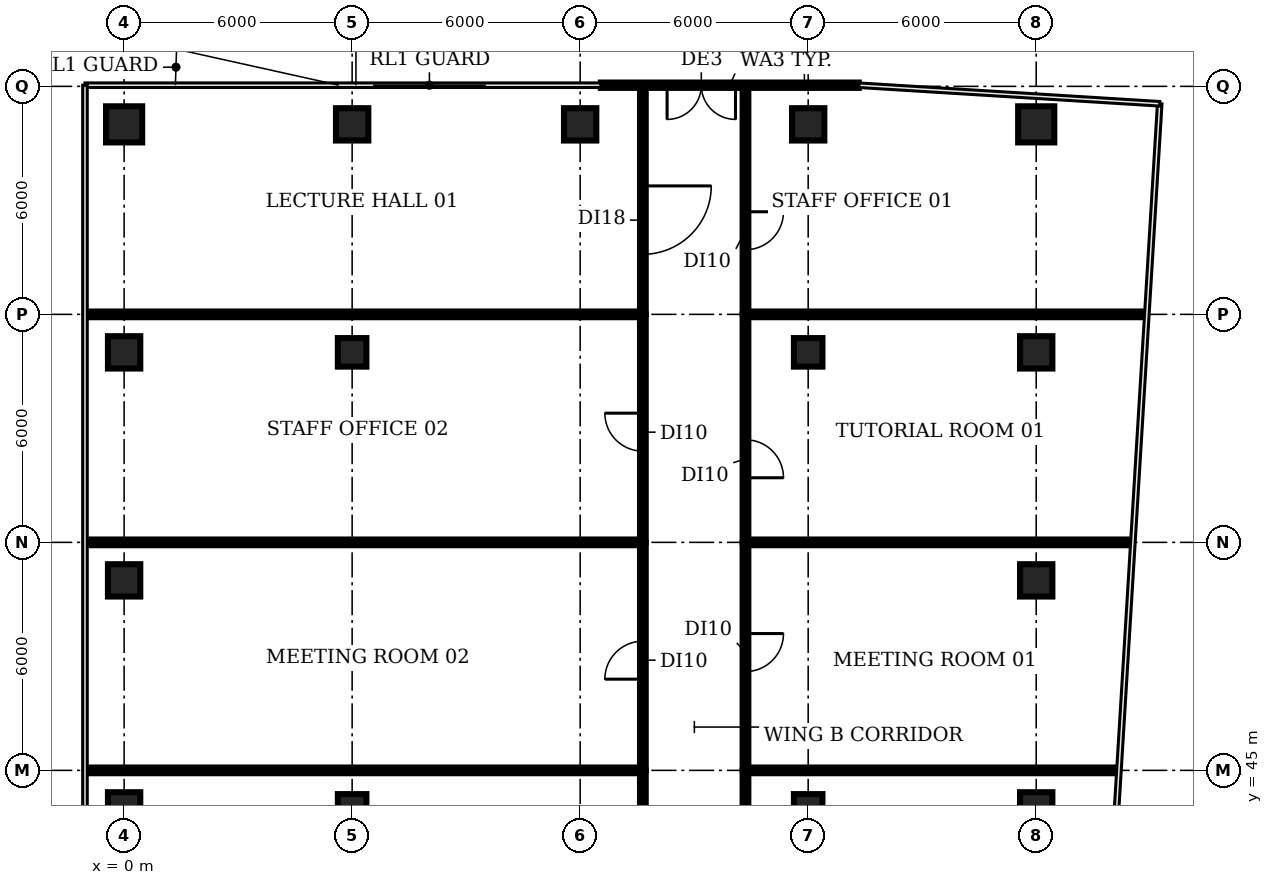
"""IFC4 building model, lengths in metres.
Left out: names, types, materials, properties, quantities, classifications, styles, units other than length and angle.
Written with IfcOpenShell. Run it as: python <this file> out.ifc"""

import sys

from ifc_helpers import new_model, si_unit, direction, frame, frame_2d, origin, origin_2d, place, context, subcontext, project, spatial, rectangle, circle, extrude, element, fill, save


model = new_model("IFC4")
c1 = context("Model", 3, precision=1e-05, world=origin(), true_north=direction((0.0, 1.0)))
c2 = subcontext(c1, "Body", "Model", "MODEL_VIEW")
j1 = project(units=[si_unit("LENGTHUNIT", "METRE"), si_unit("PLANEANGLEUNIT", "RADIAN")], contexts=[c1])
p1 = place(None, origin())
s1 = spatial("IfcSite", under=j1, at=p1, CompositionType="ELEMENT")
p2 = place(p1, origin())
s2 = spatial("IfcBuilding", under=s1, at=p2, CompositionType="ELEMENT")
p3 = place(p2, frame((0.0, 0.0, 155.0)))
s3 = spatial("IfcBuildingStorey", under=s2, at=p3, CompositionType="ELEMENT", Elevation=155.0)
for number, where, z_axis, x_axis in (
    (1, (0.0, 44.0, 0.0), (0.0, 0.0, 1.0), (1.0, 0.0, 0.0)),
    (2, (0.0, 50.0, 0.0), (0.0, 0.0, 1.0), (1.0, 0.0, 0.0)),
    (3, (0.0, 56.0, 0.0), (0.0, 0.0, 1.0), (1.0, 0.0, 0.0)),
):
    element("IfcColumn", number, at=place(p3, frame(where, z_axis=z_axis, x_axis=x_axis)), inside=s3, PredefinedType="COLUMN", context=c2, shape_type="SweptSolid", body=[
        extrude(rectangle(XDim=0.85, YDim=0.85, at=origin_2d()), origin(), (0.0, 0.0, 1.0), 3.85),
    ])
p4 = place(p3, frame((0.0, 62.0, 0.0), z_axis=(0.0, 0.0, 1.0), x_axis=(1.0, 0.0, 0.0)))
e4 = element("IfcColumn", 4, at=p4, inside=s3, PredefinedType="COLUMN", context=c2, shape_type="SweptSolid", body=[
    extrude(circle(Radius=0.475, at=origin_2d()), origin(), (0.0, 0.0, 1.0), 3.85),
])
for number, where, z_axis, x_axis in (
    (5, (6.0, 44.0, 0.0), (0.0, 0.0, 1.0), (1.0, 0.0, 0.0)),
    (6, (6.0, 56.0, 0.0), (0.0, 0.0, 1.0), (1.0, 0.0, 0.0)),
):
    element("IfcColumn", number, at=place(p3, frame(where, z_axis=z_axis, x_axis=x_axis)), inside=s3, PredefinedType="COLUMN", context=c2, shape_type="SweptSolid", body=[
        extrude(rectangle(XDim=0.75, YDim=0.75, at=origin_2d()), origin(), (0.0, 0.0, 1.0), 3.85),
    ])
for number, where, z_axis, x_axis in (
    (7, (6.0, 62.0, 0.0), (0.0, 0.0, 1.0), (1.0, 0.0, 0.0)),
    (8, (12.0, 62.0, 0.0), (0.0, 0.0, 1.0), (1.0, 0.0, 0.0)),
):
    element("IfcColumn", number, at=place(p3, frame(where, z_axis=z_axis, x_axis=x_axis)), inside=s3, PredefinedType="COLUMN", context=c2, shape_type="SweptSolid", body=[
        extrude(rectangle(XDim=0.85, YDim=0.85, at=origin_2d()), origin(), (0.0, 0.0, 1.0), 3.85),
    ])
for number, where, z_axis, x_axis in (
    (9, (18.0, 44.0, 0.0), (0.0, 0.0, 1.0), (1.0, 0.0, 0.0)),
    (10, (18.0, 56.0, 0.0), (0.0, 0.0, 1.0), (1.0, 0.0, 0.0)),
):
    element("IfcColumn", number, at=place(p3, frame(where, z_axis=z_axis, x_axis=x_axis)), inside=s3, PredefinedType="COLUMN", context=c2, shape_type="SweptSolid", body=[
        extrude(rectangle(XDim=0.75, YDim=0.75, at=origin_2d()), origin(), (0.0, 0.0, 1.0), 3.85),
    ])
for number, where, z_axis, x_axis in (
    (11, (18.0, 62.0, 0.0), (0.0, 0.0, 1.0), (1.0, 0.0, 0.0)),
    (12, (24.0, 44.0, 0.0), (0.0, 0.0, 1.0), (1.0, 0.0, 0.0)),
    (13, (24.0, 50.0, 0.0), (0.0, 0.0, 1.0), (1.0, 0.0, 0.0)),
    (14, (24.0, 56.0, 0.0), (0.0, 0.0, 1.0), (1.0, 0.0, 0.0)),
):
    element("IfcColumn", number, at=place(p3, frame(where, z_axis=z_axis, x_axis=x_axis)), inside=s3, PredefinedType="COLUMN", context=c2, shape_type="SweptSolid", body=[
        extrude(rectangle(XDim=0.85, YDim=0.85, at=origin_2d()), origin(), (0.0, 0.0, 1.0), 3.85),
    ])
p5 = place(p3, frame((24.0, 62.0, 0.0), z_axis=(0.0, 0.0, 1.0), x_axis=(1.0, 0.0, 0.0)))
e15 = element("IfcColumn", 15, at=p5, inside=s3, PredefinedType="COLUMN", context=c2, shape_type="SweptSolid", body=[
    extrude(circle(Radius=0.475, at=origin_2d()), origin(), (0.0, 0.0, 1.0), 3.85),
])
p6 = place(p3, frame((19.332, 63.03, 0.0), z_axis=(0.0, 0.0, 1.0), x_axis=(-1.0, 0.0, 0.0)))
e16 = element("IfcWall", 16, at=p6, inside=s3, PredefinedType="SOLIDWALL", context=c2, shape_type="SweptSolid", body=[
    extrude(rectangle(XDim=6.787, YDim=0.14, at=frame_2d((3.394, 0.0))), origin(), (0.0, 0.0, 1.0), 3.85),
])
p7 = place(p6, frame((3.244, 0.0, 0.0)))
e17 = element("IfcOpeningElement", 17, at=p7, cuts=e16, PredefinedType="OPENING", context=c2, shape_type="SweptSolid", body=[
    extrude(rectangle(XDim=1.8, YDim=2.4, at=frame_2d((0.9, 1.2))), frame((0.0, 0.08, 0.0), z_axis=(0.0, -1.0, 0.0), x_axis=(1.0, 0.0, 0.0)), (0.0, 0.0, 1.0), 0.16),
])
for number, where, z_axis, x_axis in (
    (18, (-0.965, 45.0, 0.0), (0.0, 0.0, 1.0), (1.0, 0.0, 0.0)),
    (19, (-0.965, 51.0, 0.0), (0.0, 0.0, 1.0), (1.0, 0.0, 0.0)),
    (20, (-0.965, 57.0, 0.0), (0.0, 0.0, 1.0), (1.0, 0.0, 0.0)),
):
    element("IfcWall", number, at=place(p3, frame(where, z_axis=z_axis, x_axis=x_axis)), inside=s3, PredefinedType="PARTITIONING", context=c2, shape_type="SweptSolid", body=[
        extrude(rectangle(XDim=14.615, YDim=0.15, at=frame_2d((7.308, 0.0))), origin(), (0.0, 0.0, 1.0), 2.88),
    ])
p8 = place(p3, frame((13.65, 34.1, 0.0), z_axis=(0.0, 0.0, 1.0), x_axis=(0.0, 1.0, 0.0)))
e21 = element("IfcWall", 21, at=p8, inside=s3, PredefinedType="PARTITIONING", context=c2, shape_type="SweptSolid", body=[
    extrude(rectangle(XDim=10.9, YDim=0.15, at=frame_2d((5.45, 0.0))), origin(), (0.0, 0.0, 1.0), 2.88),
])
p9 = place(p8, frame((4.9, 0.0, 0.0)))
e22 = element("IfcOpeningElement", 22, at=p9, cuts=e21, PredefinedType="OPENING", context=c2, shape_type="SweptSolid", body=[
    extrude(rectangle(XDim=1.0, YDim=2.1, at=frame_2d((0.5, 1.05))), frame((0.0, 0.085, 0.0), z_axis=(0.0, -1.0, 0.0), x_axis=(1.0, 0.0, 0.0)), (0.0, 0.0, 1.0), 0.17),
])
p10 = place(p3, frame((13.65, 45.0, 0.0), z_axis=(0.0, 0.0, 1.0), x_axis=(0.0, 1.0, 0.0)))
e23 = element("IfcWall", 23, at=p10, inside=s3, PredefinedType="PARTITIONING", context=c2, shape_type="SweptSolid", body=[
    extrude(rectangle(XDim=6.0, YDim=0.15, at=frame_2d((3.0, 0.0))), origin(), (0.0, 0.0, 1.0), 2.88),
])
p11 = place(p10, frame((2.4, 0.0, 0.0)))
e24 = element("IfcOpeningElement", 24, at=p11, cuts=e23, PredefinedType="OPENING", context=c2, shape_type="SweptSolid", body=[
    extrude(rectangle(XDim=1.0, YDim=2.1, at=frame_2d((0.5, 1.05))), frame((0.0, 0.085, 0.0), z_axis=(0.0, -1.0, 0.0), x_axis=(1.0, 0.0, 0.0)), (0.0, 0.0, 1.0), 0.17),
])
p12 = place(p3, frame((13.65, 51.0, 0.0), z_axis=(0.0, 0.0, 1.0), x_axis=(0.0, 1.0, 0.0)))
e25 = element("IfcWall", 25, at=p12, inside=s3, PredefinedType="PARTITIONING", context=c2, shape_type="SweptSolid", body=[
    extrude(rectangle(XDim=6.0, YDim=0.15, at=frame_2d((3.0, 0.0))), origin(), (0.0, 0.0, 1.0), 2.88),
])
p13 = place(p12, frame((2.4, 0.0, 0.0)))
e26 = element("IfcOpeningElement", 26, at=p13, cuts=e25, PredefinedType="OPENING", context=c2, shape_type="SweptSolid", body=[
    extrude(rectangle(XDim=1.0, YDim=2.1, at=frame_2d((0.5, 1.05))), frame((0.0, 0.085, 0.0), z_axis=(0.0, -1.0, 0.0), x_axis=(1.0, 0.0, 0.0)), (0.0, 0.0, 1.0), 0.17),
])
p14 = place(p3, frame((13.65, 62.98, 0.0), z_axis=(0.0, 0.0, 1.0), x_axis=(0.0, -1.0, 0.0)))
e27 = element("IfcWall", 27, at=p14, inside=s3, PredefinedType="PARTITIONING", context=c2, shape_type="SweptSolid", body=[
    extrude(rectangle(XDim=5.98, YDim=0.15, at=frame_2d((2.99, 0.0))), origin(), (0.0, 0.0, 1.0), 2.88),
])
p15 = place(p14, frame((2.6, 0.0, 0.0)))
e28 = element("IfcOpeningElement", 28, at=p15, cuts=e27, PredefinedType="OPENING", context=c2, shape_type="SweptSolid", body=[
    extrude(rectangle(XDim=1.8, YDim=2.1, at=frame_2d((0.9, 1.05))), frame((0.0, 0.085, 0.0), z_axis=(0.0, -1.0, 0.0), x_axis=(1.0, 0.0, 0.0)), (0.0, 0.0, 1.0), 0.17),
])
p16 = place(p3, frame((16.35, 45.0, 0.0), z_axis=(0.0, 0.0, 1.0), x_axis=(0.0, -1.0, 0.0)))
e29 = element("IfcWall", 29, at=p16, inside=s3, PredefinedType="PARTITIONING", context=c2, shape_type="SweptSolid", body=[
    extrude(rectangle(XDim=10.9, YDim=0.15, at=frame_2d((5.45, 0.0))), origin(), (0.0, 0.0, 1.0), 2.88),
])
p17 = place(p16, frame((4.9, 0.0, 0.0)))
e30 = element("IfcOpeningElement", 30, at=p17, cuts=e29, PredefinedType="OPENING", context=c2, shape_type="SweptSolid", body=[
    extrude(rectangle(XDim=1.0, YDim=2.1, at=frame_2d((0.5, 1.05))), frame((0.0, 0.085, 0.0), z_axis=(0.0, -1.0, 0.0), x_axis=(1.0, 0.0, 0.0)), (0.0, 0.0, 1.0), 0.17),
])
p18 = place(p3, frame((16.35, 45.0, 0.0), z_axis=(0.0, 0.0, 1.0), x_axis=(1.0, 0.0, 0.0)))
e31 = element("IfcWall", 31, at=p18, inside=s3, PredefinedType="PARTITIONING", context=c2, shape_type="SweptSolid", body=[
    extrude(rectangle(XDim=9.78, YDim=0.15, at=frame_2d((4.89, 0.0))), origin(), (0.0, 0.0, 1.0), 2.88),
])
p19 = place(p3, frame((16.35, 51.0, 0.0), z_axis=(0.0, 0.0, 1.0), x_axis=(0.0, -1.0, 0.0)))
e32 = element("IfcWall", 32, at=p19, inside=s3, PredefinedType="PARTITIONING", context=c2, shape_type="SweptSolid", body=[
    extrude(rectangle(XDim=6.0, YDim=0.15, at=frame_2d((3.0, 0.0))), origin(), (0.0, 0.0, 1.0), 2.88),
])
p20 = place(p19, frame((2.4, 0.0, 0.0)))
e33 = element("IfcOpeningElement", 33, at=p20, cuts=e32, PredefinedType="OPENING", context=c2, shape_type="SweptSolid", body=[
    extrude(rectangle(XDim=1.0, YDim=2.1, at=frame_2d((0.5, 1.05))), frame((0.0, 0.085, 0.0), z_axis=(0.0, -1.0, 0.0), x_axis=(1.0, 0.0, 0.0)), (0.0, 0.0, 1.0), 0.17),
])
p21 = place(p3, frame((16.35, 51.0, 0.0), z_axis=(0.0, 0.0, 1.0), x_axis=(1.0, 0.0, 0.0)))
e34 = element("IfcWall", 34, at=p21, inside=s3, PredefinedType="PARTITIONING", context=c2, shape_type="SweptSolid", body=[
    extrude(rectangle(XDim=10.14, YDim=0.15, at=frame_2d((5.07, 0.0))), origin(), (0.0, 0.0, 1.0), 2.88),
])
p22 = place(p3, frame((16.35, 57.0, 0.0), z_axis=(0.0, 0.0, 1.0), x_axis=(0.0, -1.0, 0.0)))
e35 = element("IfcWall", 35, at=p22, inside=s3, PredefinedType="PARTITIONING", context=c2, shape_type="SweptSolid", body=[
    extrude(rectangle(XDim=6.0, YDim=0.15, at=frame_2d((3.0, 0.0))), origin(), (0.0, 0.0, 1.0), 2.88),
])
p23 = place(p22, frame((3.3, 0.0, 0.0)))
e36 = element("IfcOpeningElement", 36, at=p23, cuts=e35, PredefinedType="OPENING", context=c2, shape_type="SweptSolid", body=[
    extrude(rectangle(XDim=1.0, YDim=2.1, at=frame_2d((0.5, 1.05))), frame((0.0, 0.085, 0.0), z_axis=(0.0, -1.0, 0.0), x_axis=(1.0, 0.0, 0.0)), (0.0, 0.0, 1.0), 0.17),
])
p24 = place(p3, frame((16.35, 57.0, 0.0), z_axis=(0.0, 0.0, 1.0), x_axis=(1.0, 0.0, 0.0)))
e37 = element("IfcWall", 37, at=p24, inside=s3, PredefinedType="PARTITIONING", context=c2, shape_type="SweptSolid", body=[
    extrude(rectangle(XDim=10.51, YDim=0.15, at=frame_2d((5.255, 0.0))), origin(), (0.0, 0.0, 1.0), 2.88),
])
p25 = place(p3, frame((16.35, 62.98, 0.0), z_axis=(0.0, 0.0, 1.0), x_axis=(0.0, -1.0, 0.0)))
e38 = element("IfcWall", 38, at=p25, inside=s3, PredefinedType="PARTITIONING", context=c2, shape_type="SweptSolid", body=[
    extrude(rectangle(XDim=5.98, YDim=0.15, at=frame_2d((2.99, 0.0))), origin(), (0.0, 0.0, 1.0), 2.88),
])
p26 = place(p25, frame((3.28, 0.0, 0.0)))
e39 = element("IfcOpeningElement", 39, at=p26, cuts=e38, PredefinedType="OPENING", context=c2, shape_type="SweptSolid", body=[
    extrude(rectangle(XDim=1.0, YDim=2.1, at=frame_2d((0.5, 1.05))), frame((0.0, 0.085, 0.0), z_axis=(0.0, -1.0, 0.0), x_axis=(1.0, 0.0, 0.0)), (0.0, 0.0, 1.0), 0.17),
])
p27 = place(p7, origin())
e40 = element("IfcDoor", 40, at=p27, inside=s3, OperationType="DOUBLE_DOOR_DOUBLE_SWING", PredefinedType="DOOR", context=c2, shape_type="SweptSolid", body=[
    extrude(rectangle(XDim=1.8, YDim=2.4, at=frame_2d((0.9, 1.2))), frame((0.0, 0.025, 0.0), z_axis=(0.0, -1.0, 0.0), x_axis=(1.0, 0.0, 0.0)), (0.0, 0.0, 1.0), 0.05),
])
fill(e17, e40)
p28 = place(p11, origin())
e41 = element("IfcDoor", 41, at=p28, inside=s3, OperationType="SINGLE_SWING_LEFT", PredefinedType="DOOR", context=c2, shape_type="SweptSolid", body=[
    extrude(rectangle(XDim=1.0, YDim=2.1, at=frame_2d((0.5, 1.05))), frame((0.0, 0.025, 0.0), z_axis=(0.0, -1.0, 0.0), x_axis=(1.0, 0.0, 0.0)), (0.0, 0.0, 1.0), 0.05),
])
fill(e24, e41)
p29 = place(p13, origin())
e42 = element("IfcDoor", 42, at=p29, inside=s3, OperationType="SINGLE_SWING_RIGHT", PredefinedType="DOOR", context=c2, shape_type="SweptSolid", body=[
    extrude(rectangle(XDim=1.0, YDim=2.1, at=frame_2d((0.5, 1.05))), frame((0.0, 0.025, 0.0), z_axis=(0.0, -1.0, 0.0), x_axis=(1.0, 0.0, 0.0)), (0.0, 0.0, 1.0), 0.05),
])
fill(e26, e42)
p30 = place(p15, origin())
e43 = element("IfcDoor", 43, at=p30, inside=s3, OperationType="SINGLE_SWING_LEFT", PredefinedType="DOOR", context=c2, shape_type="SweptSolid", body=[
    extrude(rectangle(XDim=1.8, YDim=2.1, at=frame_2d((0.9, 1.05))), frame((0.0, 0.025, 0.0), z_axis=(0.0, -1.0, 0.0), x_axis=(1.0, 0.0, 0.0)), (0.0, 0.0, 1.0), 0.05),
])
fill(e28, e43)
p31 = place(p20, origin())
e44 = element("IfcDoor", 44, at=p31, inside=s3, OperationType="SINGLE_SWING_LEFT", PredefinedType="DOOR", context=c2, shape_type="SweptSolid", body=[
    extrude(rectangle(XDim=1.0, YDim=2.1, at=frame_2d((0.5, 1.05))), frame((0.0, 0.025, 0.0), z_axis=(0.0, -1.0, 0.0), x_axis=(1.0, 0.0, 0.0)), (0.0, 0.0, 1.0), 0.05),
])
fill(e33, e44)
p32 = place(p23, origin())
e45 = element("IfcDoor", 45, at=p32, inside=s3, OperationType="SINGLE_SWING_RIGHT", PredefinedType="DOOR", context=c2, shape_type="SweptSolid", body=[
    extrude(rectangle(XDim=1.0, YDim=2.1, at=frame_2d((0.5, 1.05))), frame((0.0, 0.025, 0.0), z_axis=(0.0, -1.0, 0.0), x_axis=(1.0, 0.0, 0.0)), (0.0, 0.0, 1.0), 0.05),
])
fill(e36, e45)
p33 = place(p26, origin())
e46 = element("IfcDoor", 46, at=p33, inside=s3, OperationType="SINGLE_SWING_LEFT", PredefinedType="DOOR", context=c2, shape_type="SweptSolid", body=[
    extrude(rectangle(XDim=1.0, YDim=2.1, at=frame_2d((0.5, 1.05))), frame((0.0, 0.025, 0.0), z_axis=(0.0, -1.0, 0.0), x_axis=(1.0, 0.0, 0.0)), (0.0, 0.0, 1.0), 0.05),
])
fill(e39, e46)
save(model, sys.argv[1])
